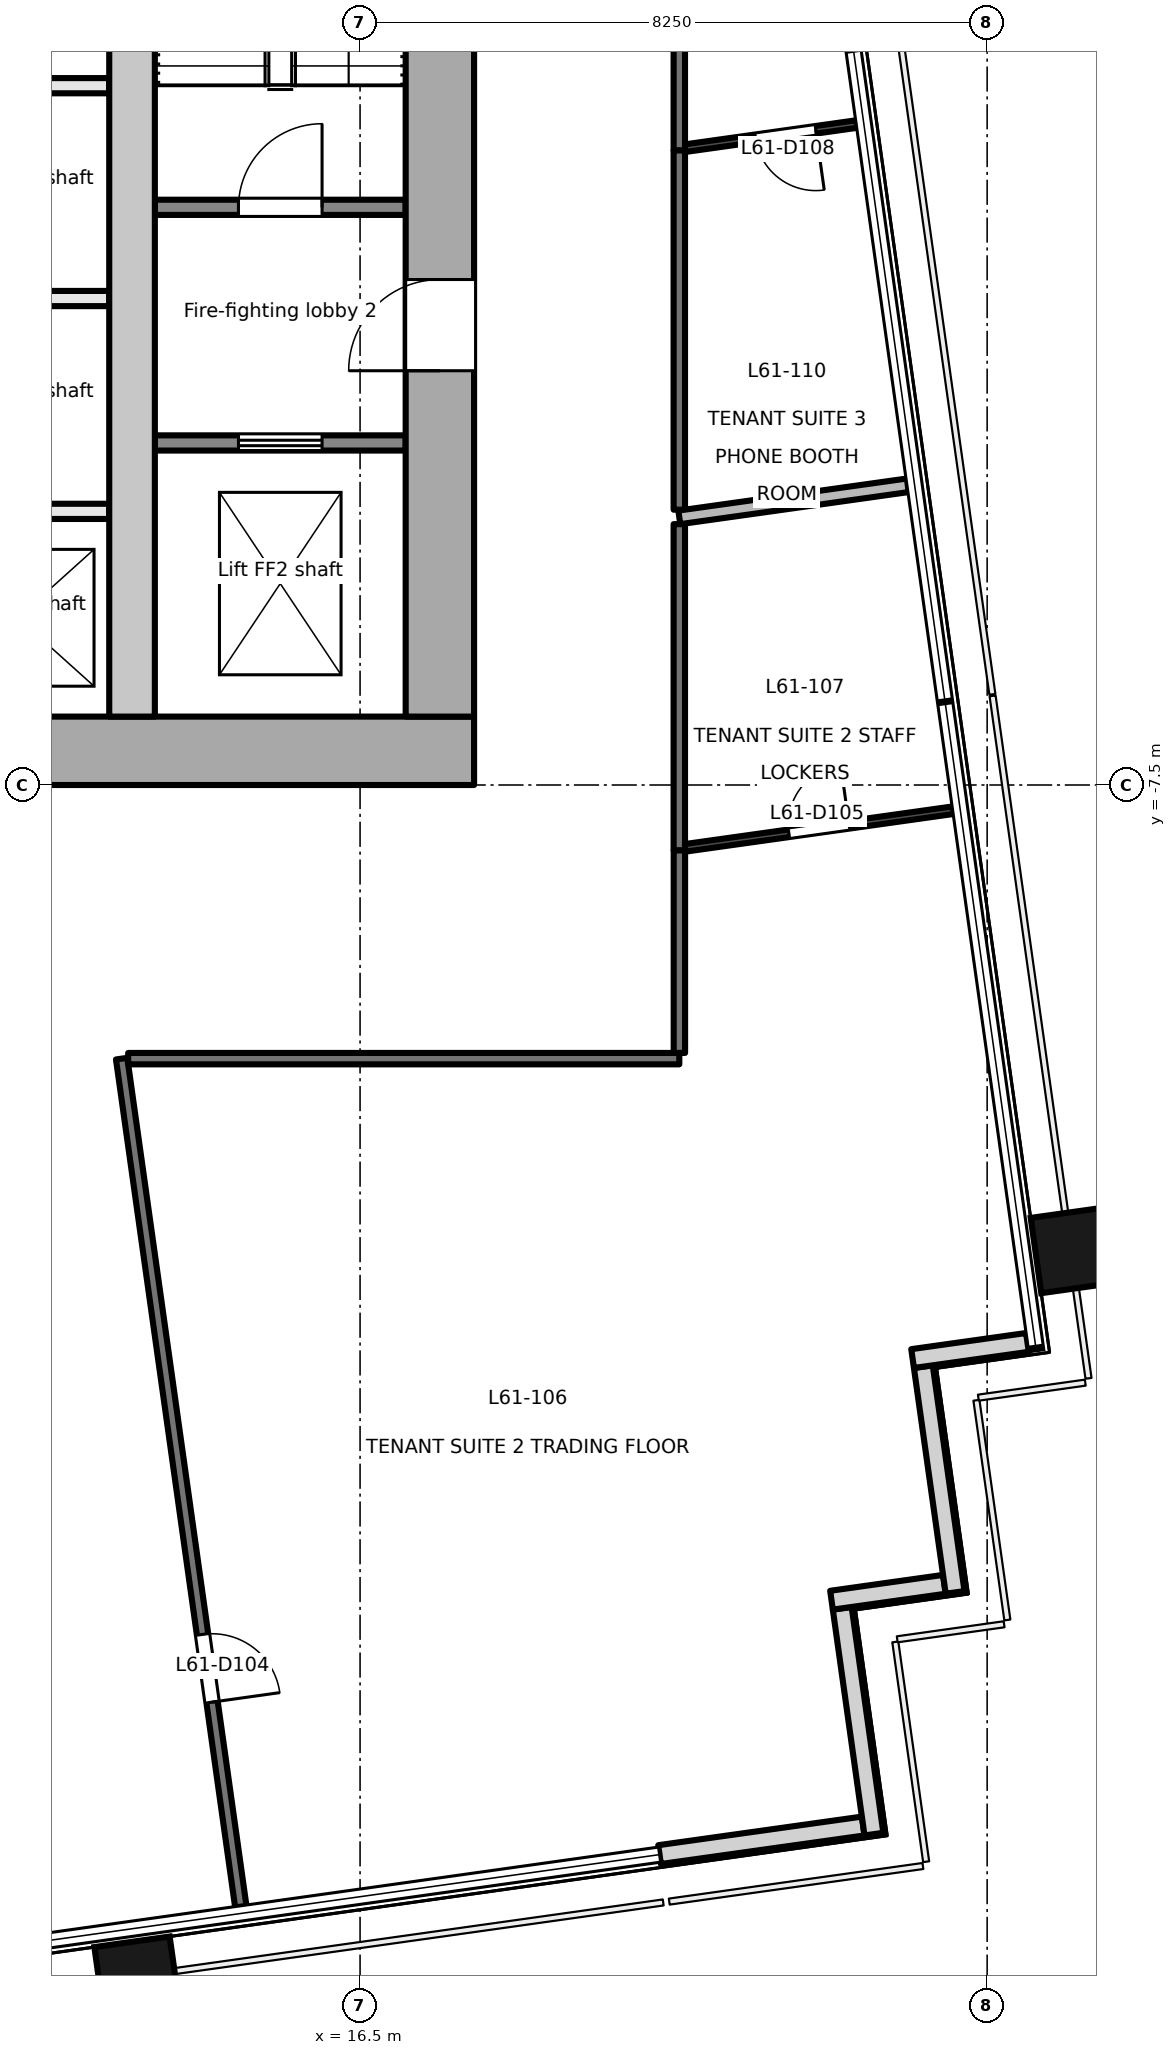
"""IFC4 building model, lengths in metres.
Left out: names, types, materials, properties, quantities, classifications, styles, units other than length and angle.
Written with IfcOpenShell. Run it as: python <this file> out.ifc"""

import sys

from ifc_helpers import new_model, si_unit, direction, frame, frame_2d, origin, origin_2d, place, context, subcontext, project, spatial, rectangle, extrude, element, fill, save


model = new_model("IFC4")
c1 = context("Model", 3, precision=1e-05, world=origin(), true_north=direction((0.0, 1.0)))
c2 = subcontext(c1, "Body", "Model", "MODEL_VIEW")
j1 = project(units=[si_unit("LENGTHUNIT", "METRE"), si_unit("PLANEANGLEUNIT", "RADIAN")], contexts=[c1])
p1 = place(None, origin())
s1 = spatial("IfcSite", under=j1, at=p1, CompositionType="ELEMENT")
p2 = place(p1, origin())
s2 = spatial("IfcBuilding", under=s1, at=p2, CompositionType="ELEMENT")
p3 = place(p2, frame((0.0, 0.0, 266.8)))
s3 = spatial("IfcBuildingStorey", under=s2, at=p3, CompositionType="ELEMENT", Elevation=266.8)
for number, where, z_axis, x_axis in (
    (1, (13.625, -23.61, -0.2), (0.0, 0.0, 1.0), (0.99, 0.139, 0.0)),
    (2, (26.284, -13.565, -0.2), (0.0, 0.0, 1.0), (-0.139, 0.99, 0.0)),
):
    element("IfcColumn", number, at=place(p3, frame(where, z_axis=z_axis, x_axis=x_axis)), inside=s3, PredefinedType="COLUMN", context=c2, shape_type="SweptSolid", body=[
        extrude(rectangle(XDim=1.0, YDim=1.8, at=origin_2d()), origin(), (0.0, 0.0, 1.0), 3.9),
    ])
p4 = place(p3, frame((20.44, -21.572, 0.0), z_axis=(0.0, 0.0, 1.0), x_axis=(0.990293105353, 0.138994839796, 0.0)))
e3 = element("IfcWall", 3, at=p4, inside=s3, PredefinedType="SOLIDWALL", context=c2, shape_type="SweptSolid", body=[
    extrude(rectangle(XDim=2.705, YDim=0.25, at=frame_2d((1.353, 0.0))), origin(), (0.0, 0.0, 1.0), 3.7),
])
p5 = place(p3, frame((23.26, -21.302, 0.0), z_axis=(0.0, 0.0, 1.0), x_axis=(-0.138994228812, 0.990293191109, 0.0)))
e4 = element("IfcWall", 4, at=p5, inside=s3, PredefinedType="SOLIDWALL", context=c2, shape_type="SweptSolid", body=[
    extrude(rectangle(XDim=3.0, YDim=0.25, at=frame_2d((1.5, 0.0))), origin(), (0.0, 0.0, 1.0), 3.7),
])
p6 = place(p3, frame((22.702, -18.225, 0.0), z_axis=(0.0, 0.0, 1.0), x_axis=(0.990243596651, 0.13934711799, 0.0)))
e5 = element("IfcWall", 5, at=p6, inside=s3, PredefinedType="SOLIDWALL", context=c2, shape_type="SweptSolid", body=[
    extrude(rectangle(XDim=1.5, YDim=0.25, at=frame_2d((0.75, 0.0))), origin(), (0.0, 0.0, 1.0), 3.7),
])
p7 = place(p3, frame((24.328, -18.122, 0.0), z_axis=(0.0, 0.0, 1.0), x_axis=(-0.139358350296, 0.990242015975, 0.0)))
e6 = element("IfcWall", 6, at=p7, inside=s3, PredefinedType="SOLIDWALL", context=c2, shape_type="SweptSolid", body=[
    extrude(rectangle(XDim=2.999, YDim=0.25, at=frame_2d((1.5, 0.0))), origin(), (0.0, 0.0, 1.0), 3.7),
])
p8 = place(p3, frame((23.769, -15.046, 0.0), z_axis=(0.0, 0.0, 1.0), x_axis=(0.990260716096, 0.139225407725, 0.0)))
e7 = element("IfcWall", 7, at=p8, inside=s3, PredefinedType="SOLIDWALL", context=c2, shape_type="SweptSolid", body=[
    extrude(rectangle(XDim=1.526, YDim=0.25, at=frame_2d((0.763, 0.0))), origin(), (0.0, 0.0, 1.0), 3.7),
])
p9 = place(p3, frame((-18.0, -7.05, -0.2), z_axis=(0.0, 0.0, 1.0), x_axis=(1.0, 0.0, 0.0)))
e8 = element("IfcWall", 8, at=p9, inside=s3, PredefinedType="SHEAR", context=c2, shape_type="SweptSolid", body=[
    extrude(rectangle(XDim=36.0, YDim=0.9, at=frame_2d((18.0, 0.0))), origin(), (0.0, 0.0, 1.0), 3.9),
])
p10 = place(p9, frame((11.3, 0.0, 0.2)))
e9 = element("IfcOpeningElement", 9, at=p10, cuts=e8, PredefinedType="OPENING", context=c2, shape_type="SweptSolid", body=[
    extrude(rectangle(XDim=1.8, YDim=2.1, at=frame_2d((0.9, 1.05))), frame((0.0, 0.46, 0.0), z_axis=(0.0, -1.0, 0.0), x_axis=(1.0, 0.0, 0.0)), (0.0, 0.0, 1.0), 0.921),
])
p11 = place(p9, frame((16.8, 0.0, 0.2)))
e10 = element("IfcOpeningElement", 10, at=p11, cuts=e8, PredefinedType="OPENING", context=c2, shape_type="SweptSolid", body=[
    extrude(rectangle(XDim=2.4, YDim=2.1, at=frame_2d((1.2, 1.05))), frame((0.0, 0.46, 0.0), z_axis=(0.0, -1.0, 0.0), x_axis=(1.0, 0.0, 0.0)), (0.0, 0.0, 1.0), 0.921),
])
p12 = place(p9, frame((26.1, 0.0, 0.2)))
e11 = element("IfcOpeningElement", 11, at=p12, cuts=e8, PredefinedType="OPENING", context=c2, shape_type="SweptSolid", body=[
    extrude(rectangle(XDim=2.4, YDim=2.1, at=frame_2d((1.2, 1.05))), frame((0.0, 0.46, 0.0), z_axis=(0.0, -1.0, 0.0), x_axis=(1.0, 0.0, 0.0)), (0.0, 0.0, 1.0), 0.921),
])
p13 = place(p3, frame((17.55, -6.6, -0.2), z_axis=(0.0, 0.0, 1.0), x_axis=(0.0, 1.0, 0.0)))
e12 = element("IfcWall", 12, at=p13, inside=s3, PredefinedType="SHEAR", context=c2, shape_type="SweptSolid", body=[
    extrude(rectangle(XDim=13.2, YDim=0.9, at=frame_2d((6.6, 0.0))), origin(), (0.0, 0.0, 1.0), 3.9),
])
p14 = place(p13, frame((4.55, 0.0, 0.2)))
e13 = element("IfcOpeningElement", 13, at=p14, cuts=e12, PredefinedType="OPENING", context=c2, shape_type="SweptSolid", body=[
    extrude(rectangle(XDim=1.2, YDim=2.1, at=frame_2d((0.6, 1.05))), frame((0.0, 0.46, 0.0), z_axis=(0.0, -1.0, 0.0), x_axis=(1.0, 0.0, 0.0)), (0.0, 0.0, 1.0), 0.921),
])
p15 = place(p3, frame((13.5, -6.6, -0.2), z_axis=(0.0, 0.0, 1.0), x_axis=(0.0, 1.0, 0.0)))
e14 = element("IfcWall", 14, at=p15, inside=s3, PredefinedType="SHEAR", context=c2, shape_type="SweptSolid", body=[
    extrude(rectangle(XDim=13.2, YDim=0.6, at=frame_2d((6.6, 0.0))), origin(), (0.0, 0.0, 1.0), 3.9),
])
p16 = place(p3, frame((13.8, -3.0, 0.0), z_axis=(0.0, 0.0, 1.0), x_axis=(1.0, 0.0, 0.0)))
e15 = element("IfcWall", 15, at=p16, inside=s3, PredefinedType="PARTITIONING", context=c2, shape_type="SweptSolid", body=[
    extrude(rectangle(XDim=3.3, YDim=0.2, at=frame_2d((1.65, 0.0))), origin(), (0.0, 0.0, 1.0), 3.7),
])
p17 = place(p16, frame((1.1, 0.0, 0.0)))
e16 = element("IfcOpeningElement", 16, at=p17, cuts=e15, PredefinedType="OPENING", context=c2, shape_type="SweptSolid", body=[
    extrude(rectangle(XDim=1.1, YDim=2.1, at=frame_2d((0.55, 1.05))), frame((0.0, 0.111, 0.0), z_axis=(0.0, -1.0, 0.0), x_axis=(1.0, 0.0, 0.0)), (0.0, 0.0, 1.0), 0.221),
])
p18 = place(p3, frame((13.8, 0.1, 0.0), z_axis=(0.0, 0.0, 1.0), x_axis=(1.0, 0.0, 0.0)))
e17 = element("IfcWall", 17, at=p18, inside=s3, PredefinedType="PARTITIONING", context=c2, shape_type="SweptSolid", body=[
    extrude(rectangle(XDim=3.3, YDim=0.2, at=frame_2d((1.65, 0.0))), origin(), (0.0, 0.0, 1.0), 3.7),
])
p19 = place(p18, frame((1.1, 0.0, 0.0)))
e18 = element("IfcOpeningElement", 18, at=p19, cuts=e17, PredefinedType="OPENING", context=c2, shape_type="SweptSolid", body=[
    extrude(rectangle(XDim=1.1, YDim=2.1, at=frame_2d((0.55, 1.05))), frame((0.0, 0.111, 0.0), z_axis=(0.0, -1.0, 0.0), x_axis=(1.0, 0.0, 0.0)), (0.0, 0.0, 1.0), 0.221),
])
for number, where, z_axis, x_axis in (
    (19, (10.9, -3.9, 0.0), (0.0, 0.0, 1.0), (1.0, 0.0, 0.0)),
    (20, (10.9, -1.1, 0.0), (0.0, 0.0, 1.0), (1.0, 0.0, 0.0)),
    (21, (10.9, 1.7, 0.0), (0.0, 0.0, 1.0), (1.0, 0.0, 0.0)),
):
    element("IfcWall", number, at=place(p3, frame(where, z_axis=z_axis, x_axis=x_axis)), inside=s3, PredefinedType="PARTITIONING", context=c2, shape_type="SweptSolid", body=[
        extrude(rectangle(XDim=2.3, YDim=0.2, at=frame_2d((1.15, 0.0))), origin(), (0.0, 0.0, 1.0), 3.7),
    ])
p20 = place(p3, frame((13.363, -11.1, 0.0), z_axis=(0.0, 0.0, 1.0), x_axis=(0.139172815303, -0.990268108888, 0.0)))
e22 = element("IfcWall", 22, at=p20, inside=s3, PredefinedType="PARTITIONING", context=c2, shape_type="SweptSolid", body=[
    extrude(rectangle(XDim=11.266, YDim=0.15, at=frame_2d((5.633, 0.0))), origin(), (0.0, 0.0, 1.0), 3.0),
])
p21 = place(p20, frame((7.649, 0.0, 0.0)))
e23 = element("IfcOpeningElement", 23, at=p21, cuts=e22, PredefinedType="OPENING", context=c2, shape_type="SweptSolid", body=[
    extrude(rectangle(XDim=0.9, YDim=2.1, at=frame_2d((0.45, 1.05))), frame((0.0, 0.085, 0.0), z_axis=(0.0, -1.0, 0.0), x_axis=(1.0, 0.0, 0.0)), (0.0, 0.0, 1.0), 0.171),
])
p22 = place(p3, frame((20.7, -11.1, 0.0), z_axis=(0.0, 0.0, 1.0), x_axis=(-1.0, 0.0, 0.0)))
e24 = element("IfcWall", 24, at=p22, inside=s3, PredefinedType="PARTITIONING", context=c2, shape_type="SweptSolid", body=[
    extrude(rectangle(XDim=7.251, YDim=0.15, at=frame_2d((3.625, 0.0))), origin(), (0.0, 0.0, 1.0), 3.0),
])
p23 = place(p3, frame((20.701, -8.358, 0.0), z_axis=(0.0, 0.0, 1.0), x_axis=(0.0, -1.0, 0.0)))
e25 = element("IfcWall", 25, at=p23, inside=s3, PredefinedType="PARTITIONING", context=c2, shape_type="SweptSolid", body=[
    extrude(rectangle(XDim=2.667, YDim=0.15, at=frame_2d((1.333, 0.0))), origin(), (0.0, 0.0, 1.0), 3.7),
])
p24 = place(p3, frame((20.7, -4.068, 0.0), z_axis=(0.0, 0.0, 1.0), x_axis=(0.0, -1.0, 0.0)))
e26 = element("IfcWall", 26, at=p24, inside=s3, PredefinedType="PARTITIONING", context=c2, shape_type="SweptSolid", body=[
    extrude(rectangle(XDim=4.29, YDim=0.15, at=frame_2d((2.145, 0.0))), origin(), (0.0, 0.0, 1.0), 3.4),
])
p25 = place(p3, frame((20.7, 7.5, 0.0), z_axis=(0.0, 0.0, 1.0), x_axis=(0.0, -1.0, 0.0)))
e27 = element("IfcWall", 27, at=p25, inside=s3, PredefinedType="PARTITIONING", context=c2, shape_type="SweptSolid", body=[
    extrude(rectangle(XDim=6.652, YDim=0.15, at=frame_2d((3.326, 0.0))), origin(), (0.0, 0.0, 1.0), 3.4),
])
p26 = place(p3, frame((20.7, 0.848, 0.0), z_axis=(0.0, 0.0, 1.0), x_axis=(0.0, -1.0, 0.0)))
e28 = element("IfcWall", 28, at=p26, inside=s3, PredefinedType="PARTITIONING", context=c2, shape_type="SweptSolid", body=[
    extrude(rectangle(XDim=4.726, YDim=0.15, at=frame_2d((2.363, 0.0))), origin(), (0.0, 0.0, 1.0), 3.4),
])
p27 = place(p3, frame((20.768, -8.328, 0.0), z_axis=(0.0, 0.0, 1.0), x_axis=(0.990282917859, 0.139067403067, 0.0)))
e29 = element("IfcWall", 29, at=p27, inside=s3, PredefinedType="PARTITIONING", context=c2, shape_type="SweptSolid", body=[
    extrude(rectangle(XDim=3.573, YDim=0.1, at=frame_2d((1.786, 0.0))), origin(), (0.0, 0.0, 1.0), 3.7),
])
p28 = place(p27, frame((1.387, 0.0, 0.0)))
e30 = element("IfcOpeningElement", 30, at=p28, cuts=e29, PredefinedType="OPENING", context=c2, shape_type="SweptSolid", body=[
    extrude(rectangle(XDim=0.8, YDim=2.1, at=frame_2d((0.4, 1.05))), frame((0.0, 0.061, 0.0), z_axis=(0.0, -1.0, 0.0), x_axis=(1.0, 0.0, 0.0)), (0.0, 0.0, 1.0), 0.121),
])
p29 = place(p3, frame((20.7, -3.979, 0.0), z_axis=(0.0, 0.0, 1.0), x_axis=(0.990284458693, 0.139056430527, 0.0)))
e31 = element("IfcWall", 31, at=p29, inside=s3, PredefinedType="PARTITIONING", context=c2, shape_type="SweptSolid", body=[
    extrude(rectangle(XDim=3.036, YDim=0.18, at=frame_2d((1.518, 0.0))), origin(), (0.0, 0.0, 1.0), 3.7),
])
p30 = place(p3, frame((23.037, 1.196, 0.0), z_axis=(0.0, 0.0, 1.0), x_axis=(-0.990256119684, -0.139258096452, 0.0)))
e32 = element("IfcWall", 32, at=p30, inside=s3, PredefinedType="PARTITIONING", context=c2, shape_type="SweptSolid", body=[
    extrude(rectangle(XDim=2.291, YDim=0.1, at=frame_2d((1.146, 0.0))), origin(), (0.0, 0.0, 1.0), 3.7),
])
p31 = place(p30, frame((0.547, 0.0, 0.0)))
e33 = element("IfcOpeningElement", 33, at=p31, cuts=e32, PredefinedType="OPENING", context=c2, shape_type="SweptSolid", body=[
    extrude(rectangle(XDim=0.8, YDim=2.1, at=frame_2d((0.4, 1.05))), frame((0.0, 0.061, 0.0), z_axis=(0.0, -1.0, 0.0), x_axis=(1.0, 0.0, 0.0)), (0.0, 0.0, 1.0), 0.121),
])
p32 = place(p17, origin())
e34 = element("IfcDoor", 34, at=p32, inside=s3, OperationType="DOUBLE_DOOR_SLIDING", PredefinedType="DOOR", context=c2, shape_type="SweptSolid", body=[
    extrude(rectangle(XDim=1.1, YDim=2.1, at=frame_2d((0.55, 1.05))), frame((0.0, 0.025, 0.0), z_axis=(0.0, -1.0, 0.0), x_axis=(1.0, 0.0, 0.0)), (0.0, 0.0, 1.0), 0.05),
])
fill(e16, e34)
p33 = place(p14, origin())
e35 = element("IfcDoor", 35, at=p33, inside=s3, OperationType="SINGLE_SWING_LEFT", PredefinedType="DOOR", context=c2, shape_type="SweptSolid", body=[
    extrude(rectangle(XDim=1.2, YDim=2.1, at=frame_2d((0.6, 1.05))), frame((0.0, 0.025, 0.0), z_axis=(0.0, -1.0, 0.0), x_axis=(1.0, 0.0, 0.0)), (0.0, 0.0, 1.0), 0.05),
])
fill(e13, e35)
p34 = place(p19, origin())
e36 = element("IfcDoor", 36, at=p34, inside=s3, OperationType="SINGLE_SWING_RIGHT", PredefinedType="DOOR", context=c2, shape_type="SweptSolid", body=[
    extrude(rectangle(XDim=1.1, YDim=2.1, at=frame_2d((0.55, 1.05))), frame((0.0, 0.025, 0.0), z_axis=(0.0, -1.0, 0.0), x_axis=(1.0, 0.0, 0.0)), (0.0, 0.0, 1.0), 0.05),
])
fill(e18, e36)
p35 = place(p21, origin())
e37 = element("IfcDoor", 37, at=p35, inside=s3, OperationType="SINGLE_SWING_RIGHT", PredefinedType="DOOR", context=c2, shape_type="SweptSolid", body=[
    extrude(rectangle(XDim=0.9, YDim=2.1, at=frame_2d((0.45, 1.05))), frame((0.0, 0.025, 0.0), z_axis=(0.0, -1.0, 0.0), x_axis=(1.0, 0.0, 0.0)), (0.0, 0.0, 1.0), 0.05),
])
fill(e23, e37)
p36 = place(p28, origin())
e38 = element("IfcDoor", 38, at=p36, inside=s3, OperationType="SINGLE_SWING_RIGHT", PredefinedType="DOOR", context=c2, shape_type="SweptSolid", body=[
    extrude(rectangle(XDim=0.8, YDim=2.1, at=frame_2d((0.4, 1.05))), frame((0.0, 0.025, 0.0), z_axis=(0.0, -1.0, 0.0), x_axis=(1.0, 0.0, 0.0)), (0.0, 0.0, 1.0), 0.05),
])
fill(e30, e38)
p37 = place(p31, origin())
e39 = element("IfcDoor", 39, at=p37, inside=s3, OperationType="SINGLE_SWING_LEFT", PredefinedType="DOOR", context=c2, shape_type="SweptSolid", body=[
    extrude(rectangle(XDim=0.8, YDim=2.1, at=frame_2d((0.4, 1.05))), frame((0.0, 0.025, 0.0), z_axis=(0.0, -1.0, 0.0), x_axis=(1.0, 0.0, 0.0)), (0.0, 0.0, 1.0), 0.05),
])
fill(e33, e39)
save(model, sys.argv[1])
